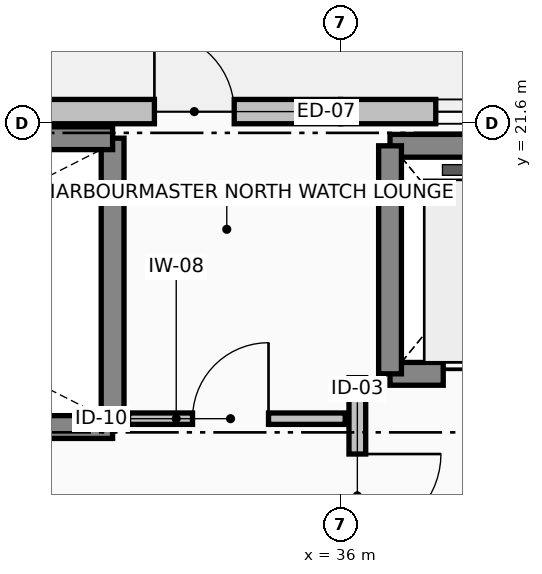
"""IFC4 building model, lengths in metres.
Left out: names, types, materials, properties, quantities, classifications, styles, units other than length and angle.
Written with IfcOpenShell. Run it as: python <this file> out.ifc"""

import sys

from ifc_helpers import new_model, si_unit, direction, frame, frame_2d, origin, place, context, subcontext, project, spatial, rectangle, extrude, element, fill, save


model = new_model("IFC4")
c1 = context("Model", 3, precision=1e-05, world=origin(), true_north=direction((0.0, 1.0)))
c2 = subcontext(c1, "Body", "Model", "MODEL_VIEW")
j1 = project(units=[si_unit("LENGTHUNIT", "METRE"), si_unit("PLANEANGLEUNIT", "RADIAN")], contexts=[c1])
p1 = place(None, origin())
s1 = spatial("IfcSite", under=j1, at=p1, CompositionType="ELEMENT")
p2 = place(p1, origin())
s2 = spatial("IfcBuilding", under=s1, at=p2, CompositionType="ELEMENT")
p3 = place(p2, frame((0.0, 0.0, 17.32)))
s3 = spatial("IfcBuildingStorey", under=s2, at=p3, CompositionType="ELEMENT", Elevation=17.32)
p4 = place(p3, frame((33.0, 17.6, 0.0), z_axis=(0.0, 0.0, 1.0), x_axis=(0.0, 1.0, 0.0)))
e1 = element("IfcWall", 1, at=p4, inside=s3, PredefinedType="SHEAR", context=c2, shape_type="SweptSolid", body=[
    extrude(rectangle(XDim=3.8, YDim=0.3, at=frame_2d((1.9, 0.0))), origin(), (0.0, 0.0, 1.0), 3.44),
])
p5 = place(p3, frame((42.0, 21.75, 0.0), z_axis=(0.0, 0.0, 1.0), x_axis=(-1.0, 0.0, 0.0)))
e2 = element("IfcWall", 2, at=p5, inside=s3, PredefinedType="SOLIDWALL", context=c2, shape_type="SweptSolid", body=[
    extrude(rectangle(XDim=6.0, YDim=0.32, at=frame_2d((3.0, 0.0))), origin(), (0.0, 0.0, 1.0), 3.42),
])
p6 = place(p5, frame((1.148, 0.0, 0.9)))
e3 = element("IfcOpeningElement", 3, at=p6, cuts=e2, PredefinedType="OPENING", context=c2, shape_type="SweptSolid", body=[
    extrude(rectangle(XDim=3.6, YDim=1.85, at=frame_2d((1.8, 0.925))), frame((0.0, 0.17, 0.0), z_axis=(0.0, -1.0, 0.0), x_axis=(1.0, 0.0, 0.0)), (0.0, 0.0, 1.0), 0.34),
])
p7 = place(p3, frame((36.0, 21.75, 0.0), z_axis=(0.0, 0.0, 1.0), x_axis=(-1.0, 0.0, 0.0)))
e4 = element("IfcWall", 4, at=p7, inside=s3, PredefinedType="SOLIDWALL", context=c2, shape_type="SweptSolid", body=[
    extrude(rectangle(XDim=6.0, YDim=0.32, at=frame_2d((3.0, 0.0))), origin(), (0.0, 0.0, 1.0), 3.42),
])
p8 = place(p7, frame((1.4, 0.0, 0.0)))
e5 = element("IfcOpeningElement", 5, at=p8, cuts=e4, PredefinedType="OPENING", context=c2, shape_type="SweptSolid", body=[
    extrude(rectangle(XDim=1.05, YDim=2.15, at=frame_2d((0.525, 1.075))), frame((0.0, 0.17, 0.0), z_axis=(0.0, -1.0, 0.0), x_axis=(1.0, 0.0, 0.0)), (0.0, 0.0, 1.0), 0.34),
])
p9 = place(p3, frame((24.0, 21.4, 0.0), z_axis=(0.0, 0.0, 1.0), x_axis=(1.0, 0.0, 0.0)))
e6 = element("IfcWall", 6, at=p9, inside=s3, PredefinedType="SHEAR", context=c2, shape_type="SweptSolid", body=[
    extrude(rectangle(XDim=9.0, YDim=0.3, at=frame_2d((4.5, 0.0))), origin(), (0.0, 0.0, 1.0), 3.44),
])
p10 = place(p3, frame((24.0, 17.6, 0.0), z_axis=(0.0, 0.0, 1.0), x_axis=(1.0, 0.0, 0.0)))
e7 = element("IfcWall", 7, at=p10, inside=s3, PredefinedType="SHEAR", context=c2, shape_type="SweptSolid", body=[
    extrude(rectangle(XDim=9.0, YDim=0.3, at=frame_2d((4.5, 0.0))), origin(), (0.0, 0.0, 1.0), 3.44),
])
p11 = place(p10, frame((0.35, 0.0, 0.0)))
e8 = element("IfcOpeningElement", 8, at=p11, cuts=e7, PredefinedType="OPENING", context=c2, shape_type="SweptSolid", body=[
    extrude(rectangle(XDim=1.15, YDim=2.15, at=frame_2d((0.575, 1.075))), frame((0.0, 0.16, 0.0), z_axis=(0.0, -1.0, 0.0), x_axis=(1.0, 0.0, 0.0)), (0.0, 0.0, 1.0), 0.32),
])
p12 = place(p3, frame((36.65, 18.3, 0.0), z_axis=(0.0, 0.0, 1.0), x_axis=(1.0, 0.0, 0.0)))
e9 = element("IfcWall", 9, at=p12, inside=s3, PredefinedType="SHEAR", context=c2, shape_type="SweptSolid", body=[
    extrude(rectangle(XDim=2.5, YDim=0.3, at=frame_2d((1.25, 0.0))), origin(), (0.0, 0.0, 1.0), 3.74),
])
p13 = place(p12, frame((0.7, 0.0, 0.0)))
e10 = element("IfcOpeningElement", 10, at=p13, cuts=e9, PredefinedType="OPENING", context=c2, shape_type="SweptSolid", body=[
    extrude(rectangle(XDim=1.1, YDim=2.1, at=frame_2d((0.55, 1.05))), frame((0.0, 0.16, 0.0), z_axis=(0.0, -1.0, 0.0), x_axis=(1.0, 0.0, 0.0)), (0.0, 0.0, 1.0), 0.32),
])
p14 = place(p3, frame((36.65, 21.3, 0.0), z_axis=(0.0, 0.0, 1.0), x_axis=(1.0, 0.0, 0.0)))
e11 = element("IfcWall", 11, at=p14, inside=s3, PredefinedType="SHEAR", context=c2, shape_type="SweptSolid", body=[
    extrude(rectangle(XDim=2.5, YDim=0.3, at=frame_2d((1.25, 0.0))), origin(), (0.0, 0.0, 1.0), 3.74),
])
p15 = place(p3, frame((36.65, 18.3, 0.0), z_axis=(0.0, 0.0, 1.0), x_axis=(0.0, 1.0, 0.0)))
e12 = element("IfcWall", 12, at=p15, inside=s3, PredefinedType="SHEAR", context=c2, shape_type="SweptSolid", body=[
    extrude(rectangle(XDim=3.0, YDim=0.3, at=frame_2d((1.5, 0.0))), origin(), (0.0, 0.0, 1.0), 3.74),
])
p16 = place(p3, frame((36.22, 18.25, 0.0), z_axis=(0.0, 0.0, 1.0), x_axis=(0.0, -1.0, 0.0)))
e13 = element("IfcWall", 13, at=p16, inside=s3, PredefinedType="SOLIDWALL", context=c2, shape_type="SweptSolid", body=[
    extrude(rectangle(XDim=3.11, YDim=0.22, at=frame_2d((1.555, 0.0))), origin(), (0.0, 0.0, 1.0), 3.46),
])
p17 = place(p16, frame((1.005, 0.0, 0.0)))
e14 = element("IfcOpeningElement", 14, at=p17, cuts=e13, PredefinedType="OPENING", context=c2, shape_type="SweptSolid", body=[
    extrude(rectangle(XDim=1.1, YDim=2.15, at=frame_2d((0.55, 1.075))), frame((0.0, 0.12, 0.0), z_axis=(0.0, -1.0, 0.0), x_axis=(1.0, 0.0, 0.0)), (0.0, 0.0, 1.0), 0.24),
])
p18 = place(p3, frame((33.21, 17.71, 0.0), z_axis=(0.0, 0.0, 1.0), x_axis=(1.0, 0.0, 0.0)))
e15 = element("IfcWall", 15, at=p18, inside=s3, PredefinedType="PARTITIONING", context=c2, shape_type="SweptSolid", body=[
    extrude(rectangle(XDim=2.85, YDim=0.15, at=frame_2d((1.425, 0.0))), origin(), (0.0, 0.0, 1.0), 3.13),
])
p19 = place(p18, frame((0.841, 0.0, 0.0)))
e16 = element("IfcOpeningElement", 16, at=p19, cuts=e15, PredefinedType="OPENING", context=c2, shape_type="SweptSolid", body=[
    extrude(rectangle(XDim=1.0, YDim=2.12, at=frame_2d((0.5, 1.06))), frame((0.0, 0.085, 0.0), z_axis=(0.0, -1.0, 0.0), x_axis=(1.0, 0.0, 0.0)), (0.0, 0.0, 1.0), 0.17),
])
p20 = place(p6, origin())
e17 = element("IfcWindow", 17, at=p20, inside=s3, PartitioningType="SINGLE_PANEL", PredefinedType="WINDOW", context=c2, shape_type="SweptSolid", body=[
    extrude(rectangle(XDim=3.6, YDim=1.85, at=frame_2d((1.8, 0.925))), frame((0.0, 0.03, 0.0), z_axis=(0.0, -1.0, 0.0), x_axis=(1.0, 0.0, 0.0)), (0.0, 0.0, 1.0), 0.06),
])
fill(e3, e17)
p21 = place(p8, frame((1.05, 0.0, 0.0), z_axis=(0.0, 0.0, 1.0), x_axis=(-1.0, 0.0, 0.0)))
e18 = element("IfcDoor", 18, at=p21, inside=s3, OperationType="SINGLE_SWING_LEFT", PredefinedType="DOOR", context=c2, shape_type="SweptSolid", body=[
    extrude(rectangle(XDim=1.05, YDim=2.15, at=frame_2d((0.525, 1.075))), frame((0.0, 0.025, 0.0), z_axis=(0.0, -1.0, 0.0), x_axis=(1.0, 0.0, 0.0)), (0.0, 0.0, 1.0), 0.05),
])
fill(e5, e18)
p22 = place(p13, origin())
e19 = element("IfcDoor", 19, at=p22, inside=s3, OperationType="SLIDING_TO_LEFT", PredefinedType="DOOR", context=c2, shape_type="SweptSolid", body=[
    extrude(rectangle(XDim=1.1, YDim=2.1, at=frame_2d((0.55, 1.05))), frame((0.0, 0.025, 0.0), z_axis=(0.0, -1.0, 0.0), x_axis=(1.0, 0.0, 0.0)), (0.0, 0.0, 1.0), 0.05),
])
fill(e10, e19)
p23 = place(p17, origin())
e20 = element("IfcDoor", 20, at=p23, inside=s3, OperationType="SINGLE_SWING_LEFT", PredefinedType="DOOR", context=c2, shape_type="SweptSolid", body=[
    extrude(rectangle(XDim=1.1, YDim=2.15, at=frame_2d((0.55, 1.075))), frame((0.0, 0.025, 0.0), z_axis=(0.0, -1.0, 0.0), x_axis=(1.0, 0.0, 0.0)), (0.0, 0.0, 1.0), 0.05),
])
fill(e14, e20)
p24 = place(p19, origin())
e21 = element("IfcDoor", 21, at=p24, inside=s3, OperationType="SINGLE_SWING_RIGHT", PredefinedType="DOOR", context=c2, shape_type="SweptSolid", body=[
    extrude(rectangle(XDim=1.0, YDim=2.12, at=frame_2d((0.5, 1.06))), frame((0.0, 0.025, 0.0), z_axis=(0.0, -1.0, 0.0), x_axis=(1.0, 0.0, 0.0)), (0.0, 0.0, 1.0), 0.05),
])
fill(e16, e21)
save(model, sys.argv[1])
